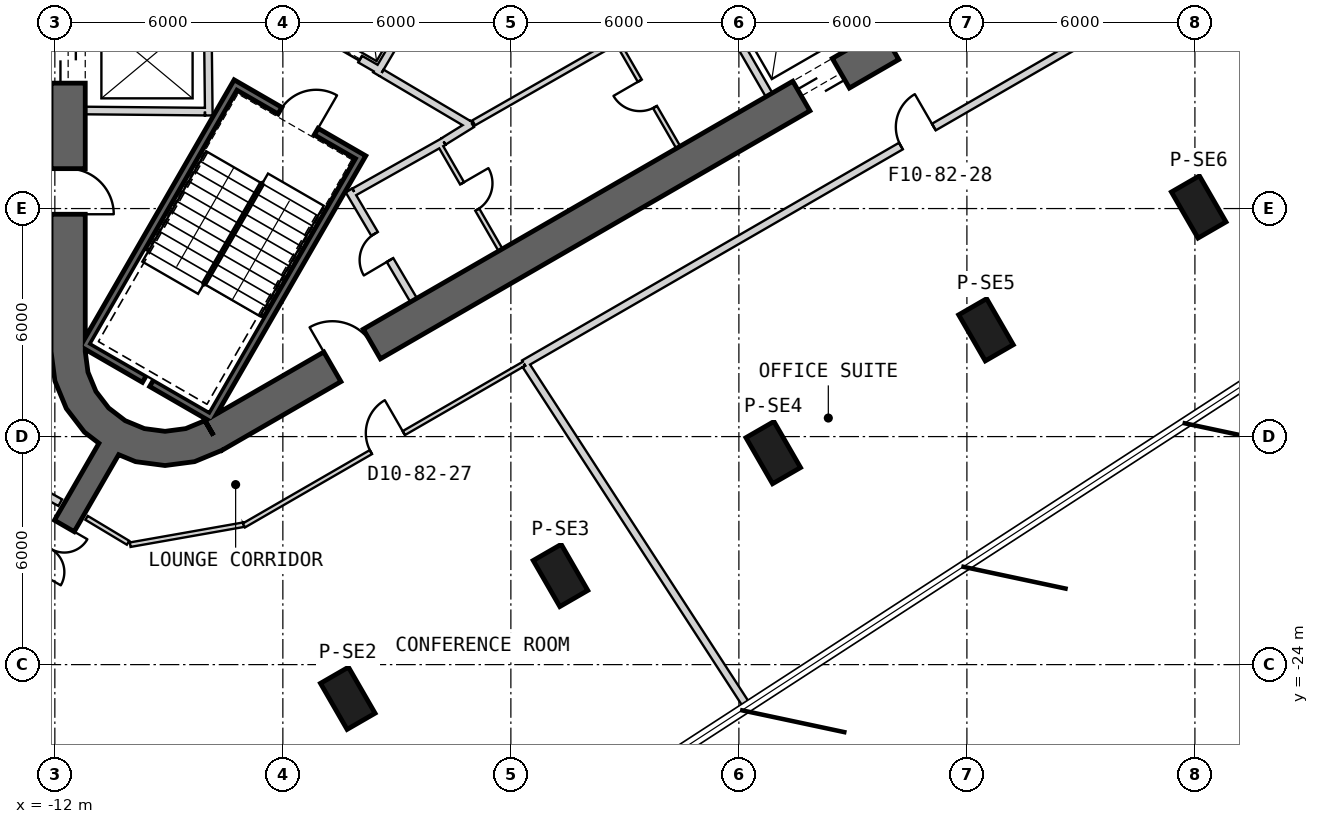
"""IFC4 building model, lengths in metres.
Left out: names, types, materials, properties, quantities, classifications, styles, units other than length and angle.
Written with IfcOpenShell. Run it as: python <this file> out.ifc"""

import sys

from ifc_helpers import new_model, si_unit, direction, frame, frame_2d, origin, origin_2d, place, context, subcontext, project, spatial, polyline, rectangle, outline, extrude, element, fill, save


model = new_model("IFC4")
c1 = context("Model", 3, precision=1e-05, world=origin(), true_north=direction((0.0, 1.0)))
c2 = subcontext(c1, "Body", "Model", "MODEL_VIEW")
j1 = project(units=[si_unit("LENGTHUNIT", "METRE"), si_unit("PLANEANGLEUNIT", "RADIAN")], contexts=[c1])
p1 = place(None, origin())
s1 = spatial("IfcSite", under=j1, at=p1, CompositionType="ELEMENT")
p2 = place(p1, origin())
s2 = spatial("IfcBuilding", under=s1, at=p2, CompositionType="ELEMENT")
p3 = place(p2, frame((0.0, 0.0, 357.2)))
s3 = spatial("IfcBuildingStorey", under=s2, at=p3, CompositionType="ELEMENT", Elevation=357.2)
for number, where, z_axis, x_axis in (
    (1, (-4.292, -24.886, 0.0), (0.0, 0.0, 1.0), (0.5, -0.866, 0.0)),
    (2, (1.306, -21.654, 0.0), (0.0, 0.0, 1.0), (0.5, -0.866, 0.0)),
    (3, (6.904, -18.422, 0.0), (0.0, 0.0, 1.0), (0.5, -0.866, 0.0)),
    (4, (12.502, -15.19, 0.0), (0.0, 0.0, 1.0), (0.5, -0.866, 0.0)),
    (5, (18.1, -11.958, 0.0), (0.0, 0.0, 1.0), (0.5, -0.866, 0.0)),
):
    element("IfcColumn", number, at=place(p3, frame(where, z_axis=z_axis, x_axis=x_axis)), inside=s3, PredefinedType="COLUMN", context=c2, shape_type="SweptSolid", body=[
        extrude(rectangle(XDim=1.4, YDim=0.85, at=origin_2d()), origin(), (0.0, 0.0, 1.0), 3.9),
    ])
p4 = place(p3, frame((-11.65, 15.762, 0.0), z_axis=(0.0, 0.0, 1.0), x_axis=(0.0, -1.0, 0.0)))
e6 = element("IfcWall", 6, at=p4, inside=s3, PredefinedType="SHEAR", context=c2, shape_type="SweptSolid", body=[
    extrude(rectangle(XDim=31.523, YDim=0.9, at=frame_2d((15.762, 0.0))), origin(), (0.0, 0.0, 1.0), 3.9),
])
p5 = place(p4, frame((7.062, 0.0, 0.0)))
e7 = element("IfcOpeningElement", 7, at=p5, cuts=e6, PredefinedType="OPENING", context=c2, shape_type="SweptSolid", body=[
    extrude(rectangle(XDim=1.2, YDim=2.4, at=frame_2d((0.6, 1.2))), frame((0.0, 0.46, 0.0), z_axis=(0.0, -1.0, 0.0), x_axis=(1.0, 0.0, 0.0)), (0.0, 0.0, 1.0), 0.92),
])
p6 = place(p4, frame((9.762, 0.0, 0.0)))
e8 = element("IfcOpeningElement", 8, at=p6, cuts=e6, PredefinedType="OPENING", context=c2, shape_type="SweptSolid", body=[
    extrude(rectangle(XDim=1.2, YDim=2.4, at=frame_2d((0.6, 1.2))), frame((0.0, 0.46, 0.0), z_axis=(0.0, -1.0, 0.0), x_axis=(1.0, 0.0, 0.0)), (0.0, 0.0, 1.0), 0.92),
])
p7 = place(p4, frame((12.462, 0.0, 0.0)))
e9 = element("IfcOpeningElement", 9, at=p7, cuts=e6, PredefinedType="OPENING", context=c2, shape_type="SweptSolid", body=[
    extrude(rectangle(XDim=1.2, YDim=2.4, at=frame_2d((0.6, 1.2))), frame((0.0, 0.46, 0.0), z_axis=(0.0, -1.0, 0.0), x_axis=(1.0, 0.0, 0.0)), (0.0, 0.0, 1.0), 0.92),
])
p8 = place(p4, frame((15.162, 0.0, 0.0)))
e10 = element("IfcOpeningElement", 10, at=p8, cuts=e6, PredefinedType="OPENING", context=c2, shape_type="SweptSolid", body=[
    extrude(rectangle(XDim=1.2, YDim=2.4, at=frame_2d((0.6, 1.2))), frame((0.0, 0.46, 0.0), z_axis=(0.0, -1.0, 0.0), x_axis=(1.0, 0.0, 0.0)), (0.0, 0.0, 1.0), 0.92),
])
p9 = place(p4, frame((17.862, 0.0, 0.0)))
e11 = element("IfcOpeningElement", 11, at=p9, cuts=e6, PredefinedType="OPENING", context=c2, shape_type="SweptSolid", body=[
    extrude(rectangle(XDim=1.2, YDim=2.4, at=frame_2d((0.6, 1.2))), frame((0.0, 0.46, 0.0), z_axis=(0.0, -1.0, 0.0), x_axis=(1.0, 0.0, 0.0)), (0.0, 0.0, 1.0), 0.92),
])
p10 = place(p4, frame((20.562, 0.0, 0.0)))
e12 = element("IfcOpeningElement", 12, at=p10, cuts=e6, PredefinedType="OPENING", context=c2, shape_type="SweptSolid", body=[
    extrude(rectangle(XDim=1.2, YDim=2.4, at=frame_2d((0.6, 1.2))), frame((0.0, 0.46, 0.0), z_axis=(0.0, -1.0, 0.0), x_axis=(1.0, 0.0, 0.0)), (0.0, 0.0, 1.0), 0.92),
])
p11 = place(p4, frame((23.262, 0.0, 0.0)))
e13 = element("IfcOpeningElement", 13, at=p11, cuts=e6, PredefinedType="OPENING", context=c2, shape_type="SweptSolid", body=[
    extrude(rectangle(XDim=1.2, YDim=2.4, at=frame_2d((0.6, 1.2))), frame((0.0, 0.46, 0.0), z_axis=(0.0, -1.0, 0.0), x_axis=(1.0, 0.0, 0.0)), (0.0, 0.0, 1.0), 0.92),
])
p12 = place(p4, frame((3.612, 0.0, 0.0)))
e14 = element("IfcOpeningElement", 14, at=p12, cuts=e6, PredefinedType="OPENING", context=c2, shape_type="SweptSolid", body=[
    extrude(rectangle(XDim=1.2, YDim=2.4, at=frame_2d((0.6, 1.2))), frame((0.0, 0.46, 0.0), z_axis=(0.0, -1.0, 0.0), x_axis=(1.0, 0.0, 0.0)), (0.0, 0.0, 1.0), 0.92),
])
p13 = place(p4, frame((26.712, 0.0, 0.0)))
e15 = element("IfcOpeningElement", 15, at=p13, cuts=e6, PredefinedType="OPENING", context=c2, shape_type="SweptSolid", body=[
    extrude(rectangle(XDim=1.2, YDim=2.4, at=frame_2d((0.6, 1.2))), frame((0.0, 0.46, 0.0), z_axis=(0.0, -1.0, 0.0), x_axis=(1.0, 0.0, 0.0)), (0.0, 0.0, 1.0), 0.92),
])
p14 = place(p3, frame((-7.825, -17.97, 0.0), z_axis=(0.0, 0.0, 1.0), x_axis=(0.866028369851, 0.499994862586, 0.0)))
e16 = element("IfcWall", 16, at=p14, inside=s3, PredefinedType="SHEAR", context=c2, shape_type="SweptSolid", body=[
    extrude(rectangle(XDim=31.523, YDim=0.9, at=frame_2d((15.762, 0.0))), origin(), (0.0, 0.0, 1.0), 3.9),
])
p15 = place(p14, frame((17.862, 0.0, 0.0)))
e17 = element("IfcOpeningElement", 17, at=p15, cuts=e16, PredefinedType="OPENING", context=c2, shape_type="SweptSolid", body=[
    extrude(rectangle(XDim=1.2, YDim=2.4, at=frame_2d((0.6, 1.2))), frame((0.0, 0.46, 0.0), z_axis=(0.0, -1.0, 0.0), x_axis=(1.0, 0.0, 0.0)), (0.0, 0.0, 1.0), 0.92),
])
p16 = place(p14, frame((20.562, 0.0, 0.0)))
e18 = element("IfcOpeningElement", 18, at=p16, cuts=e16, PredefinedType="OPENING", context=c2, shape_type="SweptSolid", body=[
    extrude(rectangle(XDim=1.2, YDim=2.4, at=frame_2d((0.6, 1.2))), frame((0.0, 0.46, 0.0), z_axis=(0.0, -1.0, 0.0), x_axis=(1.0, 0.0, 0.0)), (0.0, 0.0, 1.0), 0.92),
])
p17 = place(p14, frame((26.712, 0.0, 0.0)))
e19 = element("IfcOpeningElement", 19, at=p17, cuts=e16, PredefinedType="OPENING", context=c2, shape_type="SweptSolid", body=[
    extrude(rectangle(XDim=1.2, YDim=2.4, at=frame_2d((0.6, 1.2))), frame((0.0, 0.46, 0.0), z_axis=(0.0, -1.0, 0.0), x_axis=(1.0, 0.0, 0.0)), (0.0, 0.0, 1.0), 0.92),
])
p18 = place(p14, frame((3.612, 0.0, 0.0)))
e20 = element("IfcOpeningElement", 20, at=p18, cuts=e16, PredefinedType="OPENING", context=c2, shape_type="SweptSolid", body=[
    extrude(rectangle(XDim=1.2, YDim=2.4, at=frame_2d((0.6, 1.2))), frame((0.0, 0.46, 0.0), z_axis=(0.0, -1.0, 0.0), x_axis=(1.0, 0.0, 0.0)), (0.0, 0.0, 1.0), 0.92),
])
p19 = place(p3, origin())
e21 = element("IfcWall", 21, at=p19, inside=s3, PredefinedType="SHEAR", context=c2, shape_type="SweptSolid", body=[
    extrude(outline(polyline([(-12.1, -15.762), (-11.998, -16.538), (-11.698, -17.262), (-11.221, -17.883), (-10.6, -18.36), (-9.876, -18.659), (-9.1, -18.762), (-8.323, -18.659), (-7.6, -18.36), (-8.05, -17.58), (-8.556, -17.79), (-9.1, -17.862), (-9.644, -17.79), (-10.15, -17.58), (-10.585, -17.247), (-10.919, -16.812), (-11.128, -16.305), (-11.2, -15.762), (-12.1, -15.762)])), origin(), (0.0, 0.0, 1.0), 3.9),
])
p20 = place(p3, frame((-10.575, -18.316, 0.0), z_axis=(0.0, 0.0, 1.0), x_axis=(-0.500009454961, -0.866019944892, 0.0)))
e22 = element("IfcWall", 22, at=p20, inside=s3, PredefinedType="SHEAR", context=c2, shape_type="SweptSolid", body=[
    extrude(rectangle(XDim=7.388, YDim=0.6, at=frame_2d((3.694, 0.0))), origin(), (0.0, 0.0, 1.0), 3.9),
])
p21 = place(p20, frame((1.4, 0.0, 0.0)))
e23 = element("IfcOpeningElement", 23, at=p21, cuts=e22, PredefinedType="OPENING", context=c2, shape_type="SweptSolid", body=[
    extrude(rectangle(XDim=1.4, YDim=2.4, at=frame_2d((0.7, 1.2))), frame((0.0, 0.31, 0.0), z_axis=(0.0, -1.0, 0.0), x_axis=(1.0, 0.0, 0.0)), (0.0, 0.0, 1.0), 0.62),
])
p22 = place(p3, frame((-7.979, -6.85, 0.0), z_axis=(0.0, 0.0, 1.0), x_axis=(0.011121475088, -0.999938154483, 0.0)))
e24 = element("IfcWall", 24, at=p22, inside=s3, PredefinedType="PLUMBINGWALL", context=c2, shape_type="SweptSolid", body=[
    extrude(rectangle(XDim=2.7, YDim=0.2, at=frame_2d((1.35, 0.0))), origin(), (0.0, 0.0, 1.0), 3.6),
])
p23 = place(p3, frame((-8.05, -9.449, 0.0), z_axis=(0.0, 0.0, 1.0), x_axis=(-0.999957467379, 0.009222983926, 0.0)))
e25 = element("IfcWall", 25, at=p23, inside=s3, PredefinedType="PLUMBINGWALL", context=c2, shape_type="SweptSolid", body=[
    extrude(rectangle(XDim=3.15, YDim=0.2, at=frame_2d((1.575, 0.0))), origin(), (0.0, 0.0, 1.0), 3.6),
])
p24 = place(p3, frame((6.795, -9.01, 0.0), z_axis=(0.0, 0.0, 1.0), x_axis=(-0.499984717929, 0.866034226713, 0.0)))
e26 = element("IfcWall", 26, at=p24, inside=s3, PredefinedType="PLUMBINGWALL", context=c2, shape_type="SweptSolid", body=[
    extrude(rectangle(XDim=3.25, YDim=0.2, at=frame_2d((1.625, 0.0))), origin(), (0.0, 0.0, 1.0), 3.6),
])
p25 = place(p3, frame((-3.905, -10.563, -0.3), z_axis=(0.0, 0.0, 1.0), x_axis=(-0.500012932018, -0.866017937352, 0.0)))
e27 = element("IfcWall", 27, at=p25, inside=s3, PredefinedType="SHEAR", context=c2, shape_type="SweptSolid", body=[
    extrude(rectangle(XDim=8.1, YDim=0.2, at=frame_2d((4.05, 0.0))), origin(), (0.0, 0.0, 1.0), 3.9),
])
p26 = place(p3, frame((-11.282, -15.541, -0.3), z_axis=(0.0, 0.0, 1.0), x_axis=(0.866000483506, -0.500043160704, 0.0)))
e28 = element("IfcWall", 28, at=p26, inside=s3, PredefinedType="SHEAR", context=c2, shape_type="SweptSolid", body=[
    extrude(rectangle(XDim=3.8, YDim=0.2, at=frame_2d((1.9, 0.0))), origin(), (0.0, 0.0, 1.0), 3.9),
])
p27 = place(p3, frame((-7.196, -8.663, -0.3), z_axis=(0.0, 0.0, 1.0), x_axis=(-0.499997992926, -0.866026562566, 0.0)))
e29 = element("IfcWall", 29, at=p27, inside=s3, PredefinedType="SHEAR", context=c2, shape_type="SweptSolid", body=[
    extrude(rectangle(XDim=7.9, YDim=0.2, at=frame_2d((3.95, 0.0))), origin(), (0.0, 0.0, 1.0), 3.9),
])
p28 = place(p3, frame((-4.041, -10.599, -0.3), z_axis=(0.0, 0.0, 1.0), x_axis=(-0.866047807691, 0.499961193289, 0.0)))
e30 = element("IfcWall", 30, at=p28, inside=s3, PredefinedType="SHEAR", context=c2, shape_type="SweptSolid", body=[
    extrude(rectangle(XDim=3.6, YDim=0.2, at=frame_2d((1.8, 0.0))), origin(), (0.0, 0.0, 1.0), 3.9),
])
p29 = place(p28, frame((1.25, 0.0, 0.3)))
e31 = element("IfcOpeningElement", 31, at=p29, cuts=e30, PredefinedType="OPENING", context=c2, shape_type="SweptSolid", body=[
    extrude(rectangle(XDim=1.1, YDim=2.1, at=frame_2d((0.55, 1.05))), frame((0.0, 0.11, 0.0), z_axis=(0.0, -1.0, 0.0), x_axis=(1.0, 0.0, 0.0)), (0.0, 0.0, 1.0), 0.22),
])
p30 = place(p3, frame((-3.446, -8.368, 0.0), z_axis=(0.0, 0.0, 1.0), x_axis=(-0.866024647952, 0.500001309137, 0.0)))
e32 = element("IfcWall", 32, at=p30, inside=s3, PredefinedType="PLUMBINGWALL", context=c2, shape_type="SweptSolid", body=[
    extrude(rectangle(XDim=2.4, YDim=0.2, at=frame_2d((1.2, 0.0))), origin(), (0.0, 0.0, 1.0), 3.6),
])
p31 = place(p30, frame((0.6, 0.0, 0.0)))
e33 = element("IfcOpeningElement", 33, at=p31, cuts=e32, PredefinedType="OPENING", context=c2, shape_type="SweptSolid", body=[
    extrude(rectangle(XDim=1.2, YDim=2.4, at=frame_2d((0.6, 1.2))), frame((0.0, 0.11, 0.0), z_axis=(0.0, -1.0, 0.0), x_axis=(1.0, 0.0, 0.0)), (0.0, 0.0, 1.0), 0.22),
])
p32 = place(p3, frame((-1.961, -5.796, 0.0), z_axis=(0.0, 0.0, 1.0), x_axis=(-0.508647062354, -0.860975125052, 0.0)))
e34 = element("IfcWall", 34, at=p32, inside=s3, PredefinedType="PLUMBINGWALL", context=c2, shape_type="SweptSolid", body=[
    extrude(rectangle(XDim=3.1, YDim=0.2, at=frame_2d((1.55, 0.0))), origin(), (0.0, 0.0, 1.0), 3.6),
])
p33 = place(p3, frame((2.067, -11.74, 0.0), z_axis=(0.0, 0.0, 1.0), x_axis=(-0.499984717929, 0.866034226713, 0.0)))
e35 = element("IfcWall", 35, at=p33, inside=s3, PredefinedType="PARTITIONING", context=c2, shape_type="SweptSolid", body=[
    extrude(rectangle(XDim=3.25, YDim=0.12, at=frame_2d((1.625, 0.0))), origin(), (0.0, 0.0, 1.0), 3.6),
])
p34 = place(p3, frame((-4.26, -11.524, 0.0), z_axis=(0.0, 0.0, 1.0), x_axis=(0.507997497166, -0.861358544901, 0.0)))
e36 = element("IfcWall", 36, at=p34, inside=s3, PredefinedType="PARTITIONING", context=c2, shape_type="SweptSolid", body=[
    extrude(rectangle(XDim=3.35, YDim=0.2, at=frame_2d((1.675, 0.0))), origin(), (0.0, 0.0, 1.0), 3.6),
])
p35 = place(p3, frame((-1.024, -9.771, 0.0), z_axis=(0.0, 0.0, 1.0), x_axis=(-0.866029903013, -0.499992207027, 0.0)))
e37 = element("IfcWall", 37, at=p35, inside=s3, PredefinedType="PARTITIONING", context=c2, shape_type="SweptSolid", body=[
    extrude(rectangle(XDim=3.578, YDim=0.2, at=frame_2d((1.789, 0.0))), origin(), (0.0, 0.0, 1.0), 3.6),
])
p36 = place(p35, frame((1.389, 0.0, 0.0)))
e38 = element("IfcOpeningElement", 38, at=p36, cuts=e37, PredefinedType="OPENING", context=c2, shape_type="SweptSolid", body=[
    extrude(rectangle(XDim=0.8, YDim=2.1, at=frame_2d((0.4, 1.05))), frame((0.0, 0.11, 0.0), z_axis=(0.0, -1.0, 0.0), x_axis=(1.0, 0.0, 0.0)), (0.0, 0.0, 1.0), 0.22),
])
p37 = place(p3, frame((-1.023, -9.772, 0.0), z_axis=(0.0, 0.0, 1.0), x_axis=(0.874290944206, 0.485402250592, 0.0)))
e39 = element("IfcWall", 39, at=p37, inside=s3, PredefinedType="PARTITIONING", context=c2, shape_type="SweptSolid", body=[
    extrude(rectangle(XDim=1.723, YDim=0.12, at=frame_2d((0.861, 0.0))), origin(), (0.0, 0.0, 1.0), 3.6),
])
p38 = place(p3, frame((0.483, -8.936, 0.0), z_axis=(0.0, 0.0, 1.0), x_axis=(0.866028230842, 0.499995103361, 0.0)))
e40 = element("IfcWall", 40, at=p38, inside=s3, PredefinedType="PARTITIONING", context=c2, shape_type="SweptSolid", body=[
    extrude(rectangle(XDim=5.4, YDim=0.12, at=frame_2d((2.7, 0.0))), origin(), (0.0, 0.0, 1.0), 3.6),
])
p39 = place(p38, frame((2.3, 0.0, 0.0)))
e41 = element("IfcOpeningElement", 41, at=p39, cuts=e40, PredefinedType="OPENING", context=c2, shape_type="SweptSolid", body=[
    extrude(rectangle(XDim=0.8, YDim=2.1, at=frame_2d((0.4, 1.05))), frame((0.0, 0.07, 0.0), z_axis=(0.0, -1.0, 0.0), x_axis=(1.0, 0.0, 0.0)), (0.0, 0.0, 1.0), 0.14),
])
p40 = place(p3, frame((-3.401, -8.43, 0.0), z_axis=(0.0, 0.0, 1.0), x_axis=(0.860630814782, -0.509229418482, 0.0)))
e42 = element("IfcWall", 42, at=p40, inside=s3, PredefinedType="PARTITIONING", context=c2, shape_type="SweptSolid", body=[
    extrude(rectangle(XDim=2.582, YDim=0.2, at=frame_2d((1.291, 0.0))), origin(), (0.0, 0.0, 1.0), 3.6),
])
p41 = place(p3, frame((-6.505, -21.885, 0.0), z_axis=(0.0, 0.0, 1.0), x_axis=(0.866023249944, 0.500003730543, 0.0)))
e43 = element("IfcWall", 43, at=p41, inside=s3, PredefinedType="PARTITIONING", context=c2, shape_type="SweptSolid", body=[
    extrude(rectangle(XDim=9.016, YDim=0.2, at=frame_2d((4.508, 0.0))), origin(), (0.0, 0.0, 1.0), 2.97),
])
p42 = place(p41, frame((4.049, 0.0, 0.0)))
e44 = element("IfcOpeningElement", 44, at=p42, cuts=e43, PredefinedType="OPENING", context=c2, shape_type="SweptSolid", body=[
    extrude(rectangle(XDim=1.0, YDim=2.1, at=frame_2d((0.5, 1.05))), frame((0.0, 0.11, 0.0), z_axis=(0.0, -1.0, 0.0), x_axis=(1.0, 0.0, 0.0)), (0.0, 0.0, 1.0), 0.22),
])
p43 = place(p3, frame((1.303, -17.376, 0.0), z_axis=(0.0, 0.0, 1.0), x_axis=(0.866024719138, 0.50000118584, 0.0)))
e45 = element("IfcWall", 45, at=p43, inside=s3, PredefinedType="PARTITIONING", context=c2, shape_type="SweptSolid", body=[
    extrude(rectangle(XDim=14.305, YDim=0.2, at=frame_2d((7.152, 0.0))), origin(), (0.0, 0.0, 1.0), 3.07),
])
p44 = place(p43, frame((6.644, 0.0, 0.0)))
e46 = element("IfcOpeningElement", 46, at=p44, cuts=e45, PredefinedType="OPENING", context=c2, shape_type="SweptSolid", body=[
    extrude(rectangle(XDim=1.0, YDim=2.1, at=frame_2d((0.5, 1.05))), frame((0.0, 0.11, 0.0), z_axis=(0.0, -1.0, 0.0), x_axis=(1.0, 0.0, 0.0)), (0.0, 0.0, 1.0), 0.22),
])
p45 = place(p3, frame((13.691, -10.224, 0.0), z_axis=(0.0, 0.0, 1.0), x_axis=(0.866025593094, 0.499999672107, 0.0)))
e47 = element("IfcWall", 47, at=p45, inside=s3, PredefinedType="PARTITIONING", context=c2, shape_type="SweptSolid", body=[
    extrude(rectangle(XDim=9.631, YDim=0.2, at=frame_2d((4.815, 0.0))), origin(), (0.0, 0.0, 1.0), 2.97),
])
p46 = place(p45, frame((4.315, 0.0, 0.0)))
e48 = element("IfcOpeningElement", 48, at=p46, cuts=e47, PredefinedType="OPENING", context=c2, shape_type="SweptSolid", body=[
    extrude(rectangle(XDim=1.0, YDim=2.1, at=frame_2d((0.5, 1.05))), frame((0.0, 0.11, 0.0), z_axis=(0.0, -1.0, 0.0), x_axis=(1.0, 0.0, 0.0)), (0.0, 0.0, 1.0), 0.22),
])
p47 = place(p3, frame((-10.406, -22.538, 0.0), z_axis=(0.0, 0.0, 1.0), x_axis=(0.98480284819, 0.173675991999, 0.0)))
e49 = element("IfcWall", 49, at=p47, inside=s3, PredefinedType="PARTITIONING", context=c2, shape_type="SweptSolid", body=[
    extrude(rectangle(XDim=3.949, YDim=0.2, at=frame_2d((1.974, 0.0))), origin(), (0.0, 0.0, 1.0), 2.88),
])
p48 = place(p3, frame((-12.05, -21.472, 0.0), z_axis=(0.0, 0.0, 1.0), x_axis=(0.859577966481, -0.511004617924, 0.0)))
e50 = element("IfcWall", 50, at=p48, inside=s3, PredefinedType="PARTITIONING", context=c2, shape_type="SweptSolid", body=[
    extrude(rectangle(XDim=1.998, YDim=0.2, at=frame_2d((0.999, 0.0))), origin(), (0.0, 0.0, 1.0), 3.6),
])
p49 = place(p3, frame((13.731, -10.317, 0.0), z_axis=(0.0, 0.0, 1.0), x_axis=(0.544248008525, -0.838924373955, 0.0)))
e51 = element("IfcWall", 51, at=p49, inside=s3, PredefinedType="PARTITIONING", context=c2, shape_type="SweptSolid", body=[
    extrude(rectangle(XDim=8.325, YDim=0.2, at=frame_2d((4.162, 0.0))), origin(), (0.0, 0.0, 1.0), 3.6),
])
p50 = place(p3, frame((6.277, -25.076, 0.0), z_axis=(0.0, 0.0, 1.0), x_axis=(-0.5442423271, 0.838928059724, 0.0)))
e52 = element("IfcWall", 52, at=p50, inside=s3, PredefinedType="PARTITIONING", context=c2, shape_type="SweptSolid", body=[
    extrude(rectangle(XDim=9.067, YDim=0.2, at=frame_2d((4.533, 0.0))), origin(), (0.0, 0.0, 1.0), 3.6),
])
p51 = place(p29, origin())
e53 = element("IfcDoor", 53, at=p51, inside=s3, OperationType="SINGLE_SWING_RIGHT", PredefinedType="USERDEFINED", context=c2, shape_type="SweptSolid", body=[
    extrude(rectangle(XDim=1.1, YDim=2.1, at=frame_2d((0.55, 1.05))), frame((0.0, 0.025, 0.0), z_axis=(0.0, -1.0, 0.0), x_axis=(1.0, 0.0, 0.0)), (0.0, 0.0, 1.0), 0.05),
])
fill(e31, e53)
p52 = place(p31, origin())
e54 = element("IfcDoor", 54, at=p52, inside=s3, OperationType="SLIDING_TO_LEFT", PredefinedType="USERDEFINED", context=c2, shape_type="SweptSolid", body=[
    extrude(rectangle(XDim=1.2, YDim=2.4, at=frame_2d((0.6, 1.2))), frame((0.0, 0.025, 0.0), z_axis=(0.0, -1.0, 0.0), x_axis=(1.0, 0.0, 0.0)), (0.0, 0.0, 1.0), 0.05),
])
fill(e33, e54)
p53 = place(p36, origin())
e55 = element("IfcDoor", 55, at=p53, inside=s3, OperationType="SINGLE_SWING_RIGHT", PredefinedType="USERDEFINED", context=c2, shape_type="SweptSolid", body=[
    extrude(rectangle(XDim=0.8, YDim=2.1, at=frame_2d((0.4, 1.05))), frame((0.0, 0.025, 0.0), z_axis=(0.0, -1.0, 0.0), x_axis=(1.0, 0.0, 0.0)), (0.0, 0.0, 1.0), 0.05),
])
fill(e38, e55)
p54 = place(p46, origin())
e56 = element("IfcDoor", 56, at=p54, inside=s3, OperationType="SINGLE_SWING_RIGHT", PredefinedType="USERDEFINED", context=c2, shape_type="SweptSolid", body=[
    extrude(rectangle(XDim=1.0, YDim=2.1, at=frame_2d((0.5, 1.05))), frame((0.0, 0.025, 0.0), z_axis=(0.0, -1.0, 0.0), x_axis=(1.0, 0.0, 0.0)), (0.0, 0.0, 1.0), 0.05),
])
fill(e48, e56)
p55 = place(p44, origin())
e57 = element("IfcDoor", 57, at=p55, inside=s3, OperationType="SINGLE_SWING_RIGHT", PredefinedType="USERDEFINED", context=c2, shape_type="SweptSolid", body=[
    extrude(rectangle(XDim=1.0, YDim=2.1, at=frame_2d((0.5, 1.05))), frame((0.0, 0.025, 0.0), z_axis=(0.0, -1.0, 0.0), x_axis=(1.0, 0.0, 0.0)), (0.0, 0.0, 1.0), 0.05),
])
fill(e46, e57)
p56 = place(p42, origin())
e58 = element("IfcDoor", 58, at=p56, inside=s3, OperationType="SINGLE_SWING_RIGHT", PredefinedType="USERDEFINED", context=c2, shape_type="SweptSolid", body=[
    extrude(rectangle(XDim=1.0, YDim=2.1, at=frame_2d((0.5, 1.05))), frame((0.0, 0.025, 0.0), z_axis=(0.0, -1.0, 0.0), x_axis=(1.0, 0.0, 0.0)), (0.0, 0.0, 1.0), 0.05),
])
fill(e44, e58)
p57 = place(p11, origin())
e59 = element("IfcDoor", 59, at=p57, inside=s3, OperationType="SLIDING_TO_LEFT", PredefinedType="USERDEFINED", context=c2, shape_type="SweptSolid", body=[
    extrude(rectangle(XDim=1.2, YDim=2.4, at=frame_2d((0.6, 1.2))), frame((0.0, 0.025, 0.0), z_axis=(0.0, -1.0, 0.0), x_axis=(1.0, 0.0, 0.0)), (0.0, 0.0, 1.0), 0.05),
])
fill(e13, e59)
p58 = place(p15, origin())
e60 = element("IfcDoor", 60, at=p58, inside=s3, OperationType="SLIDING_TO_LEFT", PredefinedType="USERDEFINED", context=c2, shape_type="SweptSolid", body=[
    extrude(rectangle(XDim=1.2, YDim=2.4, at=frame_2d((0.6, 1.2))), frame((0.0, 0.025, 0.0), z_axis=(0.0, -1.0, 0.0), x_axis=(1.0, 0.0, 0.0)), (0.0, 0.0, 1.0), 0.05),
])
fill(e17, e60)
p59 = place(p13, origin())
e61 = element("IfcDoor", 61, at=p59, inside=s3, OperationType="SINGLE_SWING_LEFT", PredefinedType="USERDEFINED", context=c2, shape_type="SweptSolid", body=[
    extrude(rectangle(XDim=1.2, YDim=2.4, at=frame_2d((0.6, 1.2))), frame((0.0, 0.025, 0.0), z_axis=(0.0, -1.0, 0.0), x_axis=(1.0, 0.0, 0.0)), (0.0, 0.0, 1.0), 0.05),
])
fill(e15, e61)
p60 = place(p18, origin())
e62 = element("IfcDoor", 62, at=p60, inside=s3, OperationType="SINGLE_SWING_RIGHT", PredefinedType="USERDEFINED", context=c2, shape_type="SweptSolid", body=[
    extrude(rectangle(XDim=1.2, YDim=2.4, at=frame_2d((0.6, 1.2))), frame((0.0, 0.025, 0.0), z_axis=(0.0, -1.0, 0.0), x_axis=(1.0, 0.0, 0.0)), (0.0, 0.0, 1.0), 0.05),
])
fill(e20, e62)
p61 = place(p21, origin())
e63 = element("IfcDoor", 63, at=p61, inside=s3, OperationType="DOUBLE_DOOR_SINGLE_SWING", PredefinedType="NOTDEFINED", context=c2, shape_type="SweptSolid", body=[
    extrude(rectangle(XDim=1.4, YDim=2.4, at=frame_2d((0.7, 1.2))), frame((0.0, 0.025, 0.0), z_axis=(0.0, -1.0, 0.0), x_axis=(1.0, 0.0, 0.0)), (0.0, 0.0, 1.0), 0.05),
])
fill(e23, e63)
save(model, sys.argv[1])
